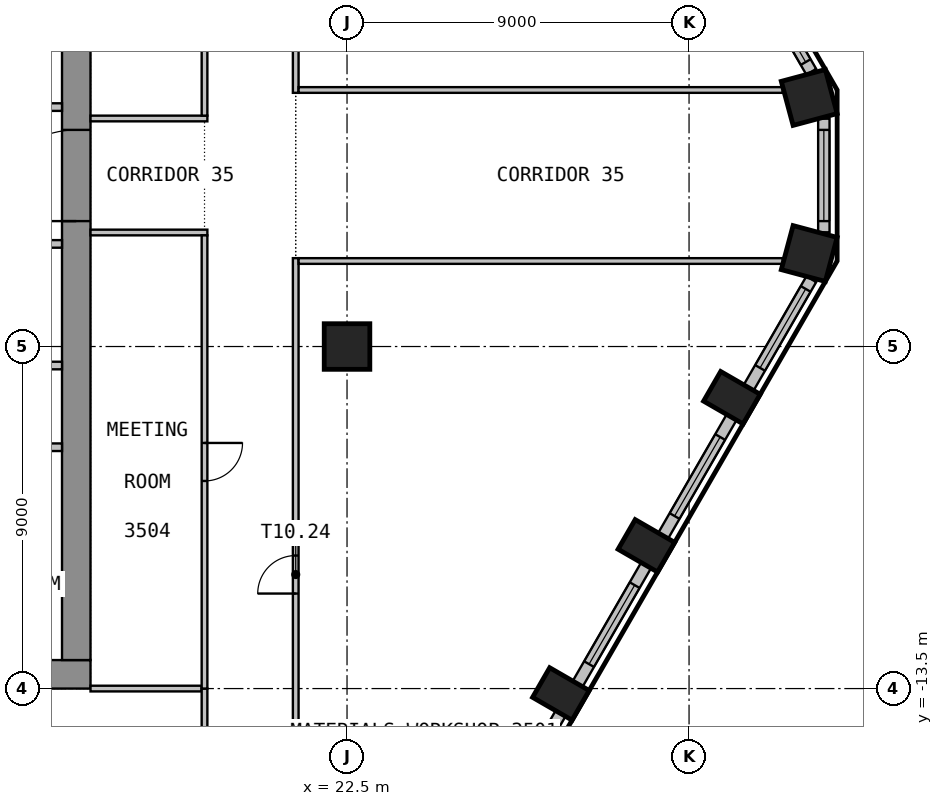
"""IFC4 building model, lengths in metres.
Left out: names, types, materials, properties, quantities, classifications, styles, units other than length and angle.
Written with IfcOpenShell. Run it as: python <this file> out.ifc"""

import sys

from ifc_helpers import new_model, si_unit, direction, frame, frame_2d, origin, origin_2d, place, context, subcontext, project, spatial, rectangle, circle, extrude, element, fill, save


model = new_model("IFC4")
c1 = context("Model", 3, precision=1e-05, world=origin(), true_north=direction((0.0, 1.0)))
c2 = subcontext(c1, "Body", "Model", "MODEL_VIEW")
j1 = project(units=[si_unit("LENGTHUNIT", "METRE"), si_unit("PLANEANGLEUNIT", "RADIAN")], contexts=[c1])
p1 = place(None, origin())
s1 = spatial("IfcSite", under=j1, at=p1, CompositionType="ELEMENT")
p2 = place(p1, origin())
s2 = spatial("IfcBuilding", under=s1, at=p2, CompositionType="ELEMENT")
p3 = place(p2, frame((0.0, 0.0, 144.3)))
s3 = spatial("IfcBuildingStorey", under=s2, at=p3, CompositionType="ELEMENT", Elevation=144.3)
for number, where, z_axis, x_axis in (
    (1, (28.127, -13.641, 0.0), (0.0, 0.0, 1.0), (0.5, 0.866, 0.0)),
    (2, (30.377, -9.744, 0.0), (0.0, 0.0, 1.0), (0.5, 0.866, 0.0)),
    (3, (32.627, -5.847, 0.0), (0.0, 0.0, 1.0), (0.5, 0.866, 0.0)),
):
    element("IfcColumn", number, at=place(p3, frame(where, z_axis=z_axis, x_axis=x_axis)), inside=s3, PredefinedType="COLUMN", context=c2, shape_type="SweptSolid", body=[
        extrude(rectangle(XDim=0.9, YDim=1.2, at=origin_2d()), origin(), (0.0, 0.0, 1.0), 3.575),
    ])
for number, where, z_axis, x_axis in (
    (4, (34.662, -2.053, 0.0), (0.0, 0.0, 1.0), (0.259, 0.966, 0.0)),
    (5, (34.662, 2.053, 0.0), (0.0, 0.0, 1.0), (-0.259, 0.966, 0.0)),
):
    element("IfcColumn", number, at=place(p3, frame(where, z_axis=z_axis, x_axis=x_axis)), inside=s3, PredefinedType="COLUMN", context=c2, shape_type="SweptSolid", body=[
        extrude(rectangle(XDim=1.2, YDim=1.2, at=origin_2d()), origin(), (0.0, 0.0, 1.0), 3.575),
    ])
p4 = place(p3, frame((22.5, -4.5, 0.0), z_axis=(0.0, 0.0, 1.0), x_axis=(1.0, 0.0, 0.0)))
e6 = element("IfcColumn", 6, at=p4, inside=s3, PredefinedType="COLUMN", context=c2, shape_type="SweptSolid", body=[
    extrude(circle(Radius=0.6, at=origin_2d()), origin(), (0.0, 0.0, 1.0), 3.575),
])
p5 = place(p3, frame((26.319, -17.273, 0.0), z_axis=(0.0, 0.0, 1.0), x_axis=(0.500027802648, 0.866009351323, 0.0)))
e7 = element("IfcWall", 7, at=p5, inside=s3, PredefinedType="SOLIDWALL", context=c2, shape_type="SweptSolid", body=[
    extrude(rectangle(XDim=3.599, YDim=0.3, at=frame_2d((1.799, 0.0))), origin(), (0.0, 0.0, 1.0), 3.575),
])
p6 = place(p5, frame((0.6, 0.0, 0.9)))
e8 = element("IfcOpeningElement", 8, at=p6, cuts=e7, PredefinedType="OPENING", context=c2, shape_type="SweptSolid", body=[
    extrude(rectangle(XDim=2.4, YDim=2.1, at=frame_2d((1.2, 1.05))), frame((0.0, 0.16, 0.0), z_axis=(0.0, -1.0, 0.0), x_axis=(1.0, 0.0, 0.0)), (0.0, 0.0, 1.0), 0.32),
])
p7 = place(p3, frame((28.569, -13.376, 0.0), z_axis=(0.0, 0.0, 1.0), x_axis=(0.500027802648, 0.866009351323, 0.0)))
e9 = element("IfcWall", 9, at=p7, inside=s3, PredefinedType="SOLIDWALL", context=c2, shape_type="SweptSolid", body=[
    extrude(rectangle(XDim=3.599, YDim=0.3, at=frame_2d((1.799, 0.0))), origin(), (0.0, 0.0, 1.0), 3.575),
])
p8 = place(p7, frame((0.6, 0.0, 0.9)))
e10 = element("IfcOpeningElement", 10, at=p8, cuts=e9, PredefinedType="OPENING", context=c2, shape_type="SweptSolid", body=[
    extrude(rectangle(XDim=2.4, YDim=2.1, at=frame_2d((1.2, 1.05))), frame((0.0, 0.16, 0.0), z_axis=(0.0, -1.0, 0.0), x_axis=(1.0, 0.0, 0.0)), (0.0, 0.0, 1.0), 0.32),
])
p9 = place(p3, frame((30.819, -9.479, 0.0), z_axis=(0.0, 0.0, 1.0), x_axis=(0.500027802648, 0.866009351323, 0.0)))
e11 = element("IfcWall", 11, at=p9, inside=s3, PredefinedType="SOLIDWALL", context=c2, shape_type="SweptSolid", body=[
    extrude(rectangle(XDim=3.599, YDim=0.3, at=frame_2d((1.799, 0.0))), origin(), (0.0, 0.0, 1.0), 3.575),
])
p10 = place(p9, frame((0.6, 0.0, 0.9)))
e12 = element("IfcOpeningElement", 12, at=p10, cuts=e11, PredefinedType="OPENING", context=c2, shape_type="SweptSolid", body=[
    extrude(rectangle(XDim=2.4, YDim=2.1, at=frame_2d((1.2, 1.05))), frame((0.0, 0.16, 0.0), z_axis=(0.0, -1.0, 0.0), x_axis=(1.0, 0.0, 0.0)), (0.0, 0.0, 1.0), 0.32),
])
p11 = place(p3, frame((33.069, -5.582, 0.0), z_axis=(0.0, 0.0, 1.0), x_axis=(0.499981217486, 0.866036247602, 0.0)))
e13 = element("IfcWall", 13, at=p11, inside=s3, PredefinedType="SOLIDWALL", context=c2, shape_type="SweptSolid", body=[
    extrude(rectangle(XDim=3.294, YDim=0.3, at=frame_2d((1.647, 0.0))), origin(), (0.0, 0.0, 1.0), 3.575),
])
p12 = place(p11, frame((0.6, 0.0, 0.9)))
e14 = element("IfcOpeningElement", 14, at=p12, cuts=e13, PredefinedType="OPENING", context=c2, shape_type="SweptSolid", body=[
    extrude(rectangle(XDim=2.4, YDim=2.1, at=frame_2d((1.2, 1.05))), frame((0.0, 0.16, 0.0), z_axis=(0.0, -1.0, 0.0), x_axis=(1.0, 0.0, 0.0)), (0.0, 0.0, 1.0), 0.32),
])
p13 = place(p3, frame((35.047, -1.495, 0.0), z_axis=(0.0, 0.0, 1.0), x_axis=(0.0, 1.0, 0.0)))
e15 = element("IfcWall", 15, at=p13, inside=s3, PredefinedType="SOLIDWALL", context=c2, shape_type="SweptSolid", body=[
    extrude(rectangle(XDim=2.989, YDim=0.3, at=frame_2d((1.495, 0.0))), origin(), (0.0, 0.0, 1.0), 3.575),
])
p14 = place(p13, frame((0.295, 0.0, 0.9)))
e16 = element("IfcOpeningElement", 16, at=p14, cuts=e15, PredefinedType="OPENING", context=c2, shape_type="SweptSolid", body=[
    extrude(rectangle(XDim=2.4, YDim=2.1, at=frame_2d((1.2, 1.05))), frame((0.0, 0.16, 0.0), z_axis=(0.0, -1.0, 0.0), x_axis=(1.0, 0.0, 0.0)), (0.0, 0.0, 1.0), 0.32),
])
p15 = place(p3, frame((34.716, 2.729, 0.0), z_axis=(0.0, 0.0, 1.0), x_axis=(-0.499981217486, 0.866036247602, 0.0)))
e17 = element("IfcWall", 17, at=p15, inside=s3, PredefinedType="SOLIDWALL", context=c2, shape_type="SweptSolid", body=[
    extrude(rectangle(XDim=3.294, YDim=0.3, at=frame_2d((1.647, 0.0))), origin(), (0.0, 0.0, 1.0), 3.575),
])
p16 = place(p15, frame((0.295, 0.0, 0.9)))
e18 = element("IfcOpeningElement", 18, at=p16, cuts=e17, PredefinedType="OPENING", context=c2, shape_type="SweptSolid", body=[
    extrude(rectangle(XDim=2.4, YDim=2.1, at=frame_2d((1.2, 1.05))), frame((0.0, 0.16, 0.0), z_axis=(0.0, -1.0, 0.0), x_axis=(1.0, 0.0, 0.0)), (0.0, 0.0, 1.0), 0.32),
])
p17 = place(p3, frame((-15.75, -13.125, 0.0), z_axis=(0.0, 0.0, 1.0), x_axis=(1.0, 0.0, 0.0)))
e19 = element("IfcWall", 19, at=p17, inside=s3, PredefinedType="SHEAR", context=c2, shape_type="SweptSolid", body=[
    extrude(rectangle(XDim=31.5, YDim=0.75, at=frame_2d((15.75, 0.0))), origin(), (0.0, 0.0, 1.0), 3.575),
])
p18 = place(p17, frame((14.55, 0.0, 0.0)))
e20 = element("IfcOpeningElement", 20, at=p18, cuts=e19, PredefinedType="OPENING", context=c2, shape_type="SweptSolid", body=[
    extrude(rectangle(XDim=2.4, YDim=2.1, at=frame_2d((1.2, 1.05))), frame((0.0, 0.385, 0.0), z_axis=(0.0, -1.0, 0.0), x_axis=(1.0, 0.0, 0.0)), (0.0, 0.0, 1.0), 0.77),
])
p19 = place(p17, frame((3.3, 0.0, 0.0)))
e21 = element("IfcOpeningElement", 21, at=p19, cuts=e19, PredefinedType="OPENING", context=c2, shape_type="SweptSolid", body=[
    extrude(rectangle(XDim=1.2, YDim=2.1, at=frame_2d((0.6, 1.05))), frame((0.0, 0.385, 0.0), z_axis=(0.0, -1.0, 0.0), x_axis=(1.0, 0.0, 0.0)), (0.0, 0.0, 1.0), 0.77),
])
p20 = place(p17, frame((27.0, 0.0, 0.0)))
e22 = element("IfcOpeningElement", 22, at=p20, cuts=e19, PredefinedType="OPENING", context=c2, shape_type="SweptSolid", body=[
    extrude(rectangle(XDim=1.2, YDim=2.1, at=frame_2d((0.6, 1.05))), frame((0.0, 0.385, 0.0), z_axis=(0.0, -1.0, 0.0), x_axis=(1.0, 0.0, 0.0)), (0.0, 0.0, 1.0), 0.77),
])
p21 = place(p3, frame((15.375, -12.75, 0.0), z_axis=(0.0, 0.0, 1.0), x_axis=(0.0, 1.0, 0.0)))
e23 = element("IfcWall", 23, at=p21, inside=s3, PredefinedType="SHEAR", context=c2, shape_type="SweptSolid", body=[
    extrude(rectangle(XDim=25.5, YDim=0.75, at=frame_2d((12.75, 0.0))), origin(), (0.0, 0.0, 1.0), 3.575),
])
p22 = place(p21, frame((11.55, 0.0, 0.0)))
e24 = element("IfcOpeningElement", 24, at=p22, cuts=e23, PredefinedType="OPENING", context=c2, shape_type="SweptSolid", body=[
    extrude(rectangle(XDim=2.4, YDim=2.1, at=frame_2d((1.2, 1.05))), frame((0.0, 0.385, 0.0), z_axis=(0.0, -1.0, 0.0), x_axis=(1.0, 0.0, 0.0)), (0.0, 0.0, 1.0), 0.77),
])
p23 = place(p3, frame((12.9, 1.8, 0.0), z_axis=(0.0, 0.0, 1.0), x_axis=(1.0, 0.0, 0.0)))
e25 = element("IfcWall", 25, at=p23, inside=s3, PredefinedType="PARTITIONING", context=c2, shape_type="SweptSolid", body=[
    extrude(rectangle(XDim=2.1, YDim=0.2, at=frame_2d((1.05, 0.0))), origin(), (0.0, 0.0, 1.0), 3.575),
])
p24 = place(p3, frame((12.9, -7.15, 0.0), z_axis=(0.0, 0.0, 1.0), x_axis=(1.0, 0.0, 0.0)))
e26 = element("IfcWall", 26, at=p24, inside=s3, PredefinedType="PARTITIONING", context=c2, shape_type="SweptSolid", body=[
    extrude(rectangle(XDim=2.1, YDim=0.2, at=frame_2d((1.05, 0.0))), origin(), (0.0, 0.0, 1.0), 3.575),
])
p25 = place(p24, frame((0.6, 0.0, 0.0)))
e27 = element("IfcOpeningElement", 27, at=p25, cuts=e26, PredefinedType="OPENING", context=c2, shape_type="SweptSolid", body=[
    extrude(rectangle(XDim=0.9, YDim=2.1, at=frame_2d((0.45, 1.05))), frame((0.0, 0.11, 0.0), z_axis=(0.0, -1.0, 0.0), x_axis=(1.0, 0.0, 0.0)), (0.0, 0.0, 1.0), 0.22),
])
p26 = place(p3, frame((12.9, -5.0, 0.0), z_axis=(0.0, 0.0, 1.0), x_axis=(1.0, 0.0, 0.0)))
e28 = element("IfcWall", 28, at=p26, inside=s3, PredefinedType="PARTITIONING", context=c2, shape_type="SweptSolid", body=[
    extrude(rectangle(XDim=2.1, YDim=0.2, at=frame_2d((1.05, 0.0))), origin(), (0.0, 0.0, 1.0), 3.575),
])
p27 = place(p26, frame((0.6, 0.0, 0.0)))
e29 = element("IfcOpeningElement", 29, at=p27, cuts=e28, PredefinedType="OPENING", context=c2, shape_type="SweptSolid", body=[
    extrude(rectangle(XDim=0.9, YDim=2.1, at=frame_2d((0.45, 1.05))), frame((0.0, 0.11, 0.0), z_axis=(0.0, -1.0, 0.0), x_axis=(1.0, 0.0, 0.0)), (0.0, 0.0, 1.0), 0.22),
])
p28 = place(p3, frame((12.9, -1.8, 0.0), z_axis=(0.0, 0.0, 1.0), x_axis=(1.0, 0.0, 0.0)))
e30 = element("IfcWall", 30, at=p28, inside=s3, PredefinedType="PARTITIONING", context=c2, shape_type="SweptSolid", body=[
    extrude(rectangle(XDim=2.1, YDim=0.2, at=frame_2d((1.05, 0.0))), origin(), (0.0, 0.0, 1.0), 3.575),
])
p29 = place(p3, frame((15.75, -13.5, 0.0), z_axis=(0.0, 0.0, 1.0), x_axis=(1.0, 0.0, 0.0)))
e31 = element("IfcWall", 31, at=p29, inside=s3, PredefinedType="PARTITIONING", context=c2, shape_type="SweptSolid", body=[
    extrude(rectangle(XDim=2.925, YDim=0.15, at=frame_2d((1.462, 0.0))), origin(), (0.0, 0.0, 1.0), 3.575),
])
for number, where, z_axis, x_axis in (
    (32, (15.75, -1.5, 0.0), (0.0, 0.0, 1.0), (1.0, 0.0, 0.0)),
    (33, (18.825, 1.5, 0.0), (0.0, 0.0, 1.0), (-1.0, 0.0, 0.0)),
):
    element("IfcWall", number, at=place(p3, frame(where, z_axis=z_axis, x_axis=x_axis)), inside=s3, PredefinedType="PARTITIONING", context=c2, shape_type="SweptSolid", body=[
        extrude(rectangle(XDim=3.075, YDim=0.15, at=frame_2d((1.538, 0.0))), origin(), (0.0, 0.0, 1.0), 3.575),
    ])
p30 = place(p3, frame((18.75, -13.5, 0.0), z_axis=(0.0, 0.0, 1.0), x_axis=(0.0, -1.0, 0.0)))
e34 = element("IfcWall", 34, at=p30, inside=s3, PredefinedType="PARTITIONING", context=c2, shape_type="SweptSolid", body=[
    extrude(rectangle(XDim=2.925, YDim=0.15, at=frame_2d((1.462, 0.0))), origin(), (0.0, 0.0, 1.0), 3.575),
])
p31 = place(p3, frame((18.75, -1.575, 0.0), z_axis=(0.0, 0.0, 1.0), x_axis=(0.0, -1.0, 0.0)))
e35 = element("IfcWall", 35, at=p31, inside=s3, PredefinedType="PARTITIONING", context=c2, shape_type="SweptSolid", body=[
    extrude(rectangle(XDim=11.925, YDim=0.15, at=frame_2d((5.962, 0.0))), origin(), (0.0, 0.0, 1.0), 3.575),
])
p32 = place(p31, frame((5.462, 0.0, 0.0)))
e36 = element("IfcOpeningElement", 36, at=p32, cuts=e35, PredefinedType="OPENING", context=c2, shape_type="SweptSolid", body=[
    extrude(rectangle(XDim=1.0, YDim=2.1, at=frame_2d((0.5, 1.05))), frame((0.0, 0.085, 0.0), z_axis=(0.0, -1.0, 0.0), x_axis=(1.0, 0.0, 0.0)), (0.0, 0.0, 1.0), 0.17),
])
p33 = place(p3, frame((18.75, 10.5, 0.0), z_axis=(0.0, 0.0, 1.0), x_axis=(0.0, -1.0, 0.0)))
e37 = element("IfcWall", 37, at=p33, inside=s3, PredefinedType="PARTITIONING", context=c2, shape_type="SweptSolid", body=[
    extrude(rectangle(XDim=8.925, YDim=0.15, at=frame_2d((4.462, 0.0))), origin(), (0.0, 0.0, 1.0), 3.575),
])
p34 = place(p33, frame((3.962, 0.0, 0.0)))
e38 = element("IfcOpeningElement", 38, at=p34, cuts=e37, PredefinedType="OPENING", context=c2, shape_type="SweptSolid", body=[
    extrude(rectangle(XDim=1.0, YDim=2.1, at=frame_2d((0.5, 1.05))), frame((0.0, 0.085, 0.0), z_axis=(0.0, -1.0, 0.0), x_axis=(1.0, 0.0, 0.0)), (0.0, 0.0, 1.0), 0.17),
])
p35 = place(p3, frame((21.15, -18.825, 0.0), z_axis=(0.0, 0.0, 1.0), x_axis=(0.0, 1.0, 0.0)))
e39 = element("IfcWall", 39, at=p35, inside=s3, PredefinedType="PARTITIONING", context=c2, shape_type="SweptSolid", body=[
    extrude(rectangle(XDim=16.65, YDim=0.15, at=frame_2d((8.325, 0.0))), origin(), (0.0, 0.0, 1.0), 3.575),
])
p36 = place(p35, frame((7.825, 0.0, 0.0)))
e40 = element("IfcOpeningElement", 40, at=p36, cuts=e39, PredefinedType="OPENING", context=c2, shape_type="SweptSolid", body=[
    extrude(rectangle(XDim=1.0, YDim=2.1, at=frame_2d((0.5, 1.05))), frame((0.0, 0.085, 0.0), z_axis=(0.0, -1.0, 0.0), x_axis=(1.0, 0.0, 0.0)), (0.0, 0.0, 1.0), 0.17),
])
p37 = place(p3, frame((33.968, -2.25, 0.0), z_axis=(0.0, 0.0, 1.0), x_axis=(-1.0, 0.0, 0.0)))
e41 = element("IfcWall", 41, at=p37, inside=s3, PredefinedType="PARTITIONING", context=c2, shape_type="SweptSolid", body=[
    extrude(rectangle(XDim=12.743, YDim=0.15, at=frame_2d((6.371, 0.0))), origin(), (0.0, 0.0, 1.0), 3.575),
])
p38 = place(p3, frame((21.15, 2.175, 0.0), z_axis=(0.0, 0.0, 1.0), x_axis=(0.0, 1.0, 0.0)))
e42 = element("IfcWall", 42, at=p38, inside=s3, PredefinedType="PARTITIONING", context=c2, shape_type="SweptSolid", body=[
    extrude(rectangle(XDim=16.65, YDim=0.15, at=frame_2d((8.325, 0.0))), origin(), (0.0, 0.0, 1.0), 3.575),
])
p39 = place(p38, frame((7.825, 0.0, 0.0)))
e43 = element("IfcOpeningElement", 43, at=p39, cuts=e42, PredefinedType="OPENING", context=c2, shape_type="SweptSolid", body=[
    extrude(rectangle(XDim=1.0, YDim=2.1, at=frame_2d((0.5, 1.05))), frame((0.0, 0.085, 0.0), z_axis=(0.0, -1.0, 0.0), x_axis=(1.0, 0.0, 0.0)), (0.0, 0.0, 1.0), 0.17),
])
p40 = place(p3, frame((21.225, 2.25, 0.0), z_axis=(0.0, 0.0, 1.0), x_axis=(1.0, 0.0, 0.0)))
e44 = element("IfcWall", 44, at=p40, inside=s3, PredefinedType="PARTITIONING", context=c2, shape_type="SweptSolid", body=[
    extrude(rectangle(XDim=12.743, YDim=0.15, at=frame_2d((6.371, 0.0))), origin(), (0.0, 0.0, 1.0), 3.575),
])
p41 = place(p8, origin())
e45 = element("IfcWindow", 45, at=p41, inside=s3, PartitioningType="SINGLE_PANEL", PredefinedType="WINDOW", context=c2, shape_type="SweptSolid", body=[
    extrude(rectangle(XDim=2.4, YDim=2.1, at=frame_2d((1.2, 1.05))), frame((0.0, 0.03, 0.0), z_axis=(0.0, -1.0, 0.0), x_axis=(1.0, 0.0, 0.0)), (0.0, 0.0, 1.0), 0.06),
])
fill(e10, e45)
p42 = place(p10, origin())
e46 = element("IfcWindow", 46, at=p42, inside=s3, PartitioningType="SINGLE_PANEL", PredefinedType="WINDOW", context=c2, shape_type="SweptSolid", body=[
    extrude(rectangle(XDim=2.4, YDim=2.1, at=frame_2d((1.2, 1.05))), frame((0.0, 0.03, 0.0), z_axis=(0.0, -1.0, 0.0), x_axis=(1.0, 0.0, 0.0)), (0.0, 0.0, 1.0), 0.06),
])
fill(e12, e46)
p43 = place(p12, origin())
e47 = element("IfcWindow", 47, at=p43, inside=s3, PartitioningType="SINGLE_PANEL", PredefinedType="WINDOW", context=c2, shape_type="SweptSolid", body=[
    extrude(rectangle(XDim=2.4, YDim=2.1, at=frame_2d((1.2, 1.05))), frame((0.0, 0.03, 0.0), z_axis=(0.0, -1.0, 0.0), x_axis=(1.0, 0.0, 0.0)), (0.0, 0.0, 1.0), 0.06),
])
fill(e14, e47)
p44 = place(p14, origin())
e48 = element("IfcWindow", 48, at=p44, inside=s3, PartitioningType="SINGLE_PANEL", PredefinedType="WINDOW", context=c2, shape_type="SweptSolid", body=[
    extrude(rectangle(XDim=2.4, YDim=2.1, at=frame_2d((1.2, 1.05))), frame((0.0, 0.03, 0.0), z_axis=(0.0, -1.0, 0.0), x_axis=(1.0, 0.0, 0.0)), (0.0, 0.0, 1.0), 0.06),
])
fill(e16, e48)
p45 = place(p16, origin())
e49 = element("IfcWindow", 49, at=p45, inside=s3, PartitioningType="SINGLE_PANEL", PredefinedType="WINDOW", context=c2, shape_type="SweptSolid", body=[
    extrude(rectangle(XDim=2.4, YDim=2.1, at=frame_2d((1.2, 1.05))), frame((0.0, 0.03, 0.0), z_axis=(0.0, -1.0, 0.0), x_axis=(1.0, 0.0, 0.0)), (0.0, 0.0, 1.0), 0.06),
])
fill(e18, e49)
p46 = place(p22, origin())
e50 = element("IfcDoor", 50, at=p46, inside=s3, OperationType="DOUBLE_DOOR_DOUBLE_SWING", PredefinedType="DOOR", context=c2, shape_type="SweptSolid", body=[
    extrude(rectangle(XDim=2.4, YDim=2.1, at=frame_2d((1.2, 1.05))), frame((0.0, 0.025, 0.0), z_axis=(0.0, -1.0, 0.0), x_axis=(1.0, 0.0, 0.0)), (0.0, 0.0, 1.0), 0.05),
])
fill(e24, e50)
p47 = place(p32, origin())
e51 = element("IfcDoor", 51, at=p47, inside=s3, OperationType="SINGLE_SWING_LEFT", PredefinedType="DOOR", context=c2, shape_type="SweptSolid", body=[
    extrude(rectangle(XDim=1.0, YDim=2.1, at=frame_2d((0.5, 1.05))), frame((0.0, 0.025, 0.0), z_axis=(0.0, -1.0, 0.0), x_axis=(1.0, 0.0, 0.0)), (0.0, 0.0, 1.0), 0.05),
])
fill(e36, e51)
p48 = place(p36, origin())
e52 = element("IfcDoor", 52, at=p48, inside=s3, OperationType="SINGLE_SWING_RIGHT", PredefinedType="DOOR", context=c2, shape_type="SweptSolid", body=[
    extrude(rectangle(XDim=1.0, YDim=2.1, at=frame_2d((0.5, 1.05))), frame((0.0, 0.025, 0.0), z_axis=(0.0, -1.0, 0.0), x_axis=(1.0, 0.0, 0.0)), (0.0, 0.0, 1.0), 0.05),
])
fill(e40, e52)
save(model, sys.argv[1])
